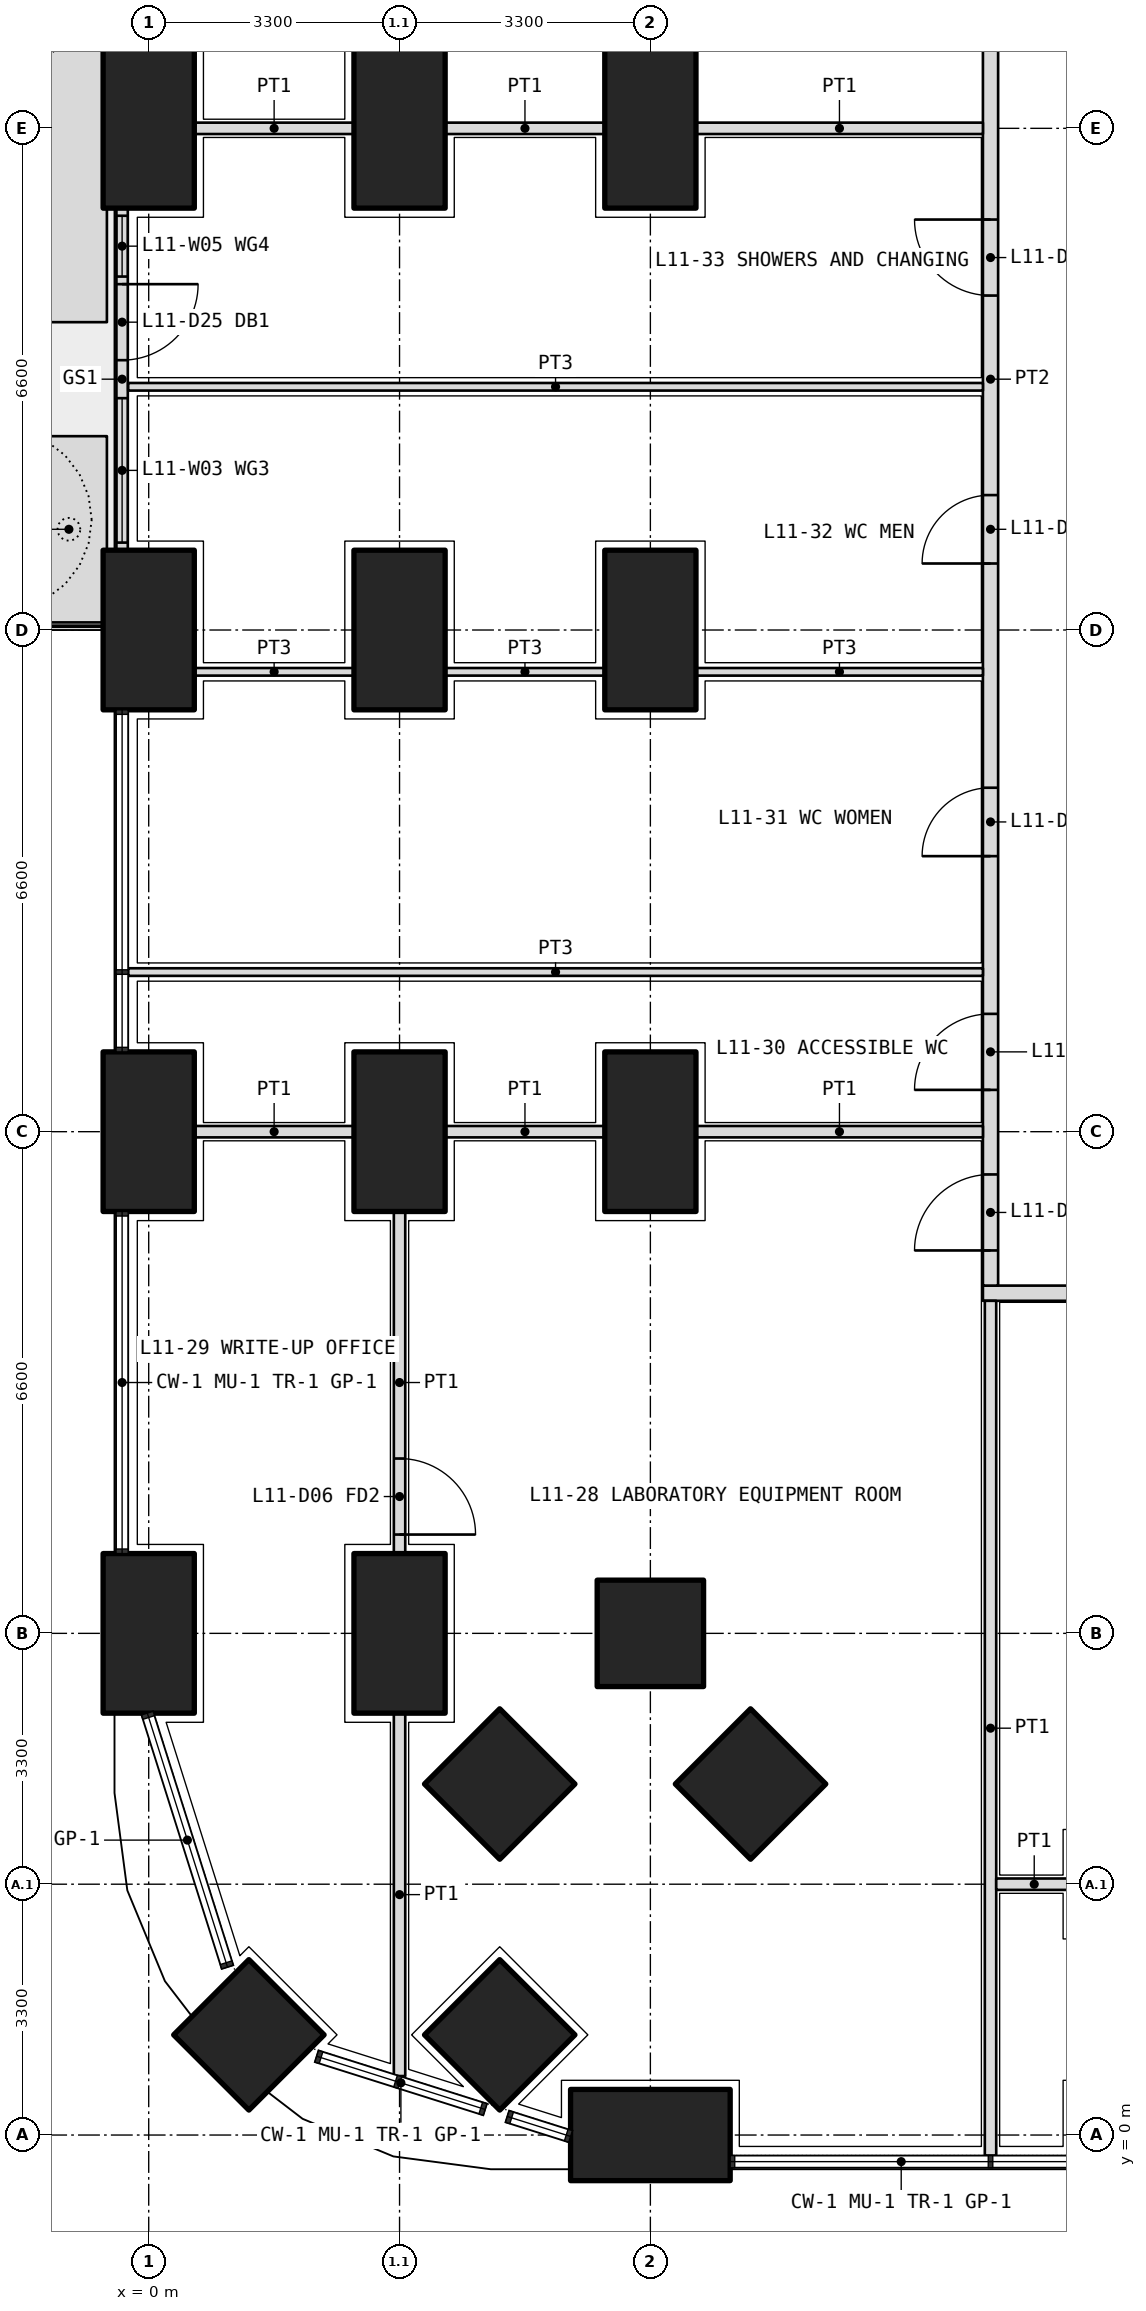
"""IFC4 building model, lengths in metres.
Left out: names, types, materials, properties, quantities, classifications, styles, units other than length and angle.
Written with IfcOpenShell. Run it as: python <this file> out.ifc"""

import sys

from ifc_helpers import new_model, si_unit, direction, frame, frame_2d, origin, origin_2d, place, context, subcontext, project, spatial, polyline, rectangle, outline, extrude, element, fill, save


model = new_model("IFC4")
c1 = context("Model", 3, precision=1e-05, world=origin(), true_north=direction((0.0, 1.0)))
c2 = subcontext(c1, "Body", "Model", "MODEL_VIEW")
j1 = project(units=[si_unit("LENGTHUNIT", "METRE"), si_unit("PLANEANGLEUNIT", "RADIAN")], contexts=[c1])
p1 = place(None, origin())
s1 = spatial("IfcSite", under=j1, at=p1, CompositionType="ELEMENT")
p2 = place(p1, origin())
s2 = spatial("IfcBuilding", under=s1, at=p2, CompositionType="ELEMENT")
p3 = place(p2, frame((0.0, 0.0, 50.7)))
s3 = spatial("IfcBuildingStorey", under=s2, at=p3, CompositionType="ELEMENT", Elevation=50.7)
p4 = place(p3, frame((1.318, 1.318, 0.0), z_axis=(0.0, 0.0, 1.0), x_axis=(0.707106781187, 0.707106781187, 0.0)))
e1 = element("IfcColumn", 1, at=p4, inside=s3, PredefinedType="COLUMN", context=c2, shape_type="SweptSolid", body=[
    extrude(rectangle(XDim=1.4, YDim=1.4, at=origin_2d()), origin(), (0.0, 0.0, 1.0), 4.2),
])
for number, where, z_axis, x_axis in (
    (2, (6.6, 0.0, 0.0), (0.0, 0.0, 1.0), (1.0, 0.0, 0.0)),
    (3, (0.0, 6.6, 0.0), (0.0, 0.0, 1.0), (0.0, 1.0, 0.0)),
    (4, (0.0, 13.2, 0.0), (0.0, 0.0, 1.0), (0.0, 1.0, 0.0)),
    (5, (0.0, 19.8, 0.0), (0.0, 0.0, 1.0), (0.0, 1.0, 0.0)),
    (6, (0.0, 26.4, 0.0), (0.0, 0.0, 1.0), (0.0, 1.0, 0.0)),
):
    element("IfcColumn", number, at=place(p3, frame(where, z_axis=z_axis, x_axis=x_axis)), inside=s3, PredefinedType="COLUMN", context=c2, shape_type="SweptSolid", body=[
        extrude(rectangle(XDim=2.1, YDim=1.2, at=origin_2d()), origin(), (0.0, 0.0, 1.0), 4.2),
    ])
for number, where, z_axis, x_axis in (
    (7, (6.6, 6.6, 0.0), (0.0, 0.0, 1.0), (1.0, 0.0, 0.0)),
    (8, (4.618, 1.318, 0.0), (0.0, 0.0, 1.0), (0.707, 0.707, 0.0)),
):
    element("IfcColumn", number, at=place(p3, frame(where, z_axis=z_axis, x_axis=x_axis)), inside=s3, PredefinedType="COLUMN", context=c2, shape_type="SweptSolid", body=[
        extrude(rectangle(XDim=1.4, YDim=1.4, at=origin_2d()), origin(), (0.0, 0.0, 1.0), 4.2),
    ])
for number, where, z_axis, x_axis in (
    (9, (3.3, 6.6, 0.0), (0.0, 0.0, 1.0), (0.0, 1.0, 0.0)),
    (10, (3.3, 13.2, 0.0), (0.0, 0.0, 1.0), (0.0, 1.0, 0.0)),
    (11, (3.3, 19.8, 0.0), (0.0, 0.0, 1.0), (0.0, 1.0, 0.0)),
    (12, (3.3, 26.4, 0.0), (0.0, 0.0, 1.0), (0.0, 1.0, 0.0)),
):
    element("IfcColumn", number, at=place(p3, frame(where, z_axis=z_axis, x_axis=x_axis)), inside=s3, PredefinedType="COLUMN", context=c2, shape_type="SweptSolid", body=[
        extrude(rectangle(XDim=2.1, YDim=1.2, at=origin_2d()), origin(), (0.0, 0.0, 1.0), 4.2),
    ])
for number, where, z_axis, x_axis in (
    (13, (4.618, 4.618, 0.0), (0.0, 0.0, 1.0), (0.707, 0.707, 0.0)),
    (14, (7.918, 4.618, 0.0), (0.0, 0.0, 1.0), (0.707, 0.707, 0.0)),
):
    element("IfcColumn", number, at=place(p3, frame(where, z_axis=z_axis, x_axis=x_axis)), inside=s3, PredefinedType="COLUMN", context=c2, shape_type="SweptSolid", body=[
        extrude(rectangle(XDim=1.4, YDim=1.4, at=origin_2d()), origin(), (0.0, 0.0, 1.0), 4.2),
    ])
for number, where, z_axis, x_axis in (
    (15, (6.6, 13.2, 0.0), (0.0, 0.0, 1.0), (0.0, 1.0, 0.0)),
    (16, (6.6, 19.8, 0.0), (0.0, 0.0, 1.0), (0.0, 1.0, 0.0)),
    (17, (6.6, 26.4, 0.0), (0.0, 0.0, 1.0), (0.0, 1.0, 0.0)),
):
    element("IfcColumn", number, at=place(p3, frame(where, z_axis=z_axis, x_axis=x_axis)), inside=s3, PredefinedType="COLUMN", context=c2, shape_type="SweptSolid", body=[
        extrude(rectangle(XDim=2.1, YDim=1.2, at=origin_2d()), origin(), (0.0, 0.0, 1.0), 4.2),
    ])
p5 = place(p3, origin())
e18 = element("IfcWall", 18, at=p5, inside=s3, PredefinedType="USERDEFINED", context=c2, shape_type="SweptSolid", body=[
    extrude(outline(polyline([(-1.55, 19.9), (-0.55, 19.9), (-0.55, 22.35), (-1.55, 22.35), (-1.55, 19.9)]), holes=[polyline([(-1.4, 20.05), (-0.7, 20.05), (-0.7, 22.2), (-1.4, 22.2), (-1.4, 20.05)])]), origin(), (0.0, 0.0, 1.0), 1.05),
])
p6 = place(p3, origin())
e19 = element("IfcWall", 19, at=p6, inside=s3, PredefinedType="USERDEFINED", context=c2, shape_type="SweptSolid", body=[
    extrude(outline(polyline([(-1.55, 23.85), (-0.55, 23.85), (-0.55, 32.9), (-1.55, 32.9), (-1.55, 23.85)]), holes=[polyline([(-1.4, 24.0), (-0.7, 24.0), (-0.7, 32.75), (-1.4, 32.75), (-1.4, 24.0)])]), origin(), (0.0, 0.0, 1.0), 1.05),
])
p7 = place(p3, frame((-0.35, 25.35, 0.0), z_axis=(0.0, 0.0, 1.0), x_axis=(0.0, -1.0, 0.0)))
e20 = element("IfcWall", 20, at=p7, inside=s3, PredefinedType="SOLIDWALL", context=c2, shape_type="SweptSolid", body=[
    extrude(rectangle(XDim=4.5, YDim=0.15, at=frame_2d((2.25, 0.0))), origin(), (0.0, 0.0, 1.0), 2.7),
])
p8 = place(p7, frame((1.0, 0.0, 0.0)))
e21 = element("IfcOpeningElement", 21, at=p8, cuts=e20, PredefinedType="OPENING", context=c2, shape_type="SweptSolid", body=[
    extrude(rectangle(XDim=1.0, YDim=2.4, at=frame_2d((0.5, 1.2))), frame((0.0, 0.085, 0.0), z_axis=(0.0, -1.0, 0.0), x_axis=(1.0, 0.0, 0.0)), (0.0, 0.0, 1.0), 0.17),
])
p9 = place(p7, frame((0.1, 0.0, 0.1)))
e22 = element("IfcOpeningElement", 22, at=p9, cuts=e20, PredefinedType="OPENING", context=c2, shape_type="SweptSolid", body=[
    extrude(rectangle(XDim=0.8, YDim=2.3, at=frame_2d((0.4, 1.15))), frame((0.0, 0.085, 0.0), z_axis=(0.0, -1.0, 0.0), x_axis=(1.0, 0.0, 0.0)), (0.0, 0.0, 1.0), 0.17),
])
p10 = place(p7, frame((2.5, 0.0, 0.1)))
e23 = element("IfcOpeningElement", 23, at=p10, cuts=e20, PredefinedType="OPENING", context=c2, shape_type="SweptSolid", body=[
    extrude(rectangle(XDim=1.9, YDim=2.3, at=frame_2d((0.95, 1.15))), frame((0.0, 0.085, 0.0), z_axis=(0.0, -1.0, 0.0), x_axis=(1.0, 0.0, 0.0)), (0.0, 0.0, 1.0), 0.17),
])
p11 = place(p3, frame((10.975, 11.075, 0.0), z_axis=(0.0, 0.0, 1.0), x_axis=(1.0, 0.0, 0.0)))
e24 = element("IfcWall", 24, at=p11, inside=s3, PredefinedType="PARTITIONING", context=c2, shape_type="SweptSolid", body=[
    extrude(rectangle(XDim=12.125, YDim=0.2, at=frame_2d((6.062, 0.0))), origin(), (0.0, 0.0, 1.0), 2.85),
])
p12 = place(p11, frame((5.613, 0.0, 0.0)))
e25 = element("IfcOpeningElement", 25, at=p12, cuts=e24, PredefinedType="OPENING", context=c2, shape_type="SweptSolid", body=[
    extrude(rectangle(XDim=1.0, YDim=2.1, at=frame_2d((0.5, 1.05))), frame((0.0, 0.11, 0.0), z_axis=(0.0, -1.0, 0.0), x_axis=(1.0, 0.0, 0.0)), (0.0, 0.0, 1.0), 0.22),
])
p13 = place(p3, frame((11.075, 11.175, 0.0), z_axis=(0.0, 0.0, 1.0), x_axis=(0.0, 1.0, 0.0)))
e26 = element("IfcWall", 26, at=p13, inside=s3, PredefinedType="PARTITIONING", context=c2, shape_type="SweptSolid", body=[
    extrude(rectangle(XDim=23.85, YDim=0.2, at=frame_2d((11.925, 0.0))), origin(), (0.0, 0.0, 1.0), 2.85),
])
p14 = place(p13, frame((0.462, 0.0, 0.0)))
e27 = element("IfcOpeningElement", 27, at=p14, cuts=e26, PredefinedType="OPENING", context=c2, shape_type="SweptSolid", body=[
    extrude(rectangle(XDim=1.0, YDim=2.1, at=frame_2d((0.5, 1.05))), frame((0.0, 0.11, 0.0), z_axis=(0.0, -1.0, 0.0), x_axis=(1.0, 0.0, 0.0)), (0.0, 0.0, 1.0), 0.22),
])
p15 = place(p13, frame((2.575, 0.0, 0.0)))
e28 = element("IfcOpeningElement", 28, at=p15, cuts=e26, PredefinedType="OPENING", context=c2, shape_type="SweptSolid", body=[
    extrude(rectangle(XDim=1.0, YDim=2.1, at=frame_2d((0.5, 1.05))), frame((0.0, 0.11, 0.0), z_axis=(0.0, -1.0, 0.0), x_axis=(1.0, 0.0, 0.0)), (0.0, 0.0, 1.0), 0.22),
])
p16 = place(p13, frame((5.65, 0.0, 0.0)))
e29 = element("IfcOpeningElement", 29, at=p16, cuts=e26, PredefinedType="OPENING", context=c2, shape_type="SweptSolid", body=[
    extrude(rectangle(XDim=0.9, YDim=2.1, at=frame_2d((0.45, 1.05))), frame((0.0, 0.11, 0.0), z_axis=(0.0, -1.0, 0.0), x_axis=(1.0, 0.0, 0.0)), (0.0, 0.0, 1.0), 0.22),
])
p17 = place(p13, frame((9.5, 0.0, 0.0)))
e30 = element("IfcOpeningElement", 30, at=p17, cuts=e26, PredefinedType="OPENING", context=c2, shape_type="SweptSolid", body=[
    extrude(rectangle(XDim=0.9, YDim=2.1, at=frame_2d((0.45, 1.05))), frame((0.0, 0.11, 0.0), z_axis=(0.0, -1.0, 0.0), x_axis=(1.0, 0.0, 0.0)), (0.0, 0.0, 1.0), 0.22),
])
p18 = place(p13, frame((13.025, 0.0, 0.0)))
e31 = element("IfcOpeningElement", 31, at=p18, cuts=e26, PredefinedType="OPENING", context=c2, shape_type="SweptSolid", body=[
    extrude(rectangle(XDim=1.0, YDim=2.1, at=frame_2d((0.5, 1.05))), frame((0.0, 0.11, 0.0), z_axis=(0.0, -1.0, 0.0), x_axis=(1.0, 0.0, 0.0)), (0.0, 0.0, 1.0), 0.22),
])
p19 = place(p13, frame((18.025, 0.0, 0.0)))
e32 = element("IfcOpeningElement", 32, at=p19, cuts=e26, PredefinedType="OPENING", context=c2, shape_type="SweptSolid", body=[
    extrude(rectangle(XDim=1.0, YDim=2.1, at=frame_2d((0.5, 1.05))), frame((0.0, 0.11, 0.0), z_axis=(0.0, -1.0, 0.0), x_axis=(1.0, 0.0, 0.0)), (0.0, 0.0, 1.0), 0.22),
])
p20 = place(p13, frame((22.387, 0.0, 0.0)))
e33 = element("IfcOpeningElement", 33, at=p20, cuts=e26, PredefinedType="OPENING", context=c2, shape_type="SweptSolid", body=[
    extrude(rectangle(XDim=1.0, YDim=2.1, at=frame_2d((0.5, 1.05))), frame((0.0, 0.11, 0.0), z_axis=(0.0, -1.0, 0.0), x_axis=(1.0, 0.0, 0.0)), (0.0, 0.0, 1.0), 0.22),
])
p21 = place(p3, frame((11.075, -0.27, 0.0), z_axis=(0.0, 0.0, 1.0), x_axis=(0.0, 1.0, 0.0)))
e34 = element("IfcWall", 34, at=p21, inside=s3, PredefinedType="PARTITIONING", context=c2, shape_type="SweptSolid", body=[
    extrude(rectangle(XDim=11.245, YDim=0.15, at=frame_2d((5.623, 0.0))), origin(), (0.0, 0.0, 1.0), 2.7),
])
p22 = place(p3, frame((11.15, 3.3, 0.0), z_axis=(0.0, 0.0, 1.0), x_axis=(1.0, 0.0, 0.0)))
e35 = element("IfcWall", 35, at=p22, inside=s3, PredefinedType="PARTITIONING", context=c2, shape_type="SweptSolid", body=[
    extrude(rectangle(XDim=1.0, YDim=0.15, at=frame_2d((0.5, 0.0))), origin(), (0.0, 0.0, 1.0), 3.9),
])
p23 = place(p3, frame((3.3, 12.15, 0.0), z_axis=(0.0, 0.0, 1.0), x_axis=(0.0, -1.0, 0.0)))
e36 = element("IfcWall", 36, at=p23, inside=s3, PredefinedType="PARTITIONING", context=c2, shape_type="SweptSolid", body=[
    extrude(rectangle(XDim=4.5, YDim=0.15, at=frame_2d((2.25, 0.0))), origin(), (0.0, 0.0, 1.0), 3.9),
])
p24 = place(p23, frame((3.25, 0.0, 0.0)))
e37 = element("IfcOpeningElement", 37, at=p24, cuts=e36, PredefinedType="OPENING", context=c2, shape_type="SweptSolid", body=[
    extrude(rectangle(XDim=1.0, YDim=2.1, at=frame_2d((0.5, 1.05))), frame((0.0, 0.085, 0.0), z_axis=(0.0, -1.0, 0.0), x_axis=(1.0, 0.0, 0.0)), (0.0, 0.0, 1.0), 0.17),
])
p25 = place(p3, frame((3.3, 5.55, 0.0), z_axis=(0.0, 0.0, 1.0), x_axis=(0.0, -1.0, 0.0)))
e38 = element("IfcWall", 38, at=p25, inside=s3, PredefinedType="PARTITIONING", context=c2, shape_type="SweptSolid", body=[
    extrude(rectangle(XDim=4.774, YDim=0.15, at=frame_2d((2.387, 0.0))), origin(), (0.0, 0.0, 1.0), 2.7),
])
p26 = place(p3, frame((-0.27, 15.3, 0.0), z_axis=(0.0, 0.0, 1.0), x_axis=(1.0, 0.0, 0.0)))
e39 = element("IfcWall", 39, at=p26, inside=s3, PredefinedType="PARTITIONING", context=c2, shape_type="SweptSolid", body=[
    extrude(rectangle(XDim=11.245, YDim=0.1, at=frame_2d((5.623, 0.0))), origin(), (0.0, 0.0, 1.0), 2.7),
])
p27 = place(p3, frame((0.6, 19.25, 0.0), z_axis=(0.0, 0.0, 1.0), x_axis=(1.0, 0.0, 0.0)))
e40 = element("IfcWall", 40, at=p27, inside=s3, PredefinedType="PARTITIONING", context=c2, shape_type="SweptSolid", body=[
    extrude(rectangle(XDim=2.1, YDim=0.1, at=frame_2d((1.05, 0.0))), origin(), (0.0, 0.0, 1.0), 2.85),
])
p28 = place(p3, frame((3.9, 19.25, 0.0), z_axis=(0.0, 0.0, 1.0), x_axis=(1.0, 0.0, 0.0)))
e41 = element("IfcWall", 41, at=p28, inside=s3, PredefinedType="PARTITIONING", context=c2, shape_type="SweptSolid", body=[
    extrude(rectangle(XDim=2.1, YDim=0.1, at=frame_2d((1.05, 0.0))), origin(), (0.0, 0.0, 1.0), 2.85),
])
p29 = place(p3, frame((7.2, 19.25, 0.0), z_axis=(0.0, 0.0, 1.0), x_axis=(1.0, 0.0, 0.0)))
e42 = element("IfcWall", 42, at=p29, inside=s3, PredefinedType="PARTITIONING", context=c2, shape_type="SweptSolid", body=[
    extrude(rectangle(XDim=3.775, YDim=0.1, at=frame_2d((1.888, 0.0))), origin(), (0.0, 0.0, 1.0), 2.85),
])
p30 = place(p3, frame((-0.27, 23.0, 0.0), z_axis=(0.0, 0.0, 1.0), x_axis=(1.0, 0.0, 0.0)))
e43 = element("IfcWall", 43, at=p30, inside=s3, PredefinedType="PARTITIONING", context=c2, shape_type="SweptSolid", body=[
    extrude(rectangle(XDim=11.245, YDim=0.1, at=frame_2d((5.623, 0.0))), origin(), (0.0, 0.0, 1.0), 2.7),
])
p31 = place(p3, frame((0.6, 13.2, 0.0), z_axis=(0.0, 0.0, 1.0), x_axis=(1.0, 0.0, 0.0)))
e44 = element("IfcWall", 44, at=p31, inside=s3, PredefinedType="PARTITIONING", context=c2, shape_type="SweptSolid", body=[
    extrude(rectangle(XDim=2.1, YDim=0.15, at=frame_2d((1.05, 0.0))), origin(), (0.0, 0.0, 1.0), 2.85),
])
p32 = place(p3, frame((3.9, 13.2, 0.0), z_axis=(0.0, 0.0, 1.0), x_axis=(1.0, 0.0, 0.0)))
e45 = element("IfcWall", 45, at=p32, inside=s3, PredefinedType="PARTITIONING", context=c2, shape_type="SweptSolid", body=[
    extrude(rectangle(XDim=2.1, YDim=0.15, at=frame_2d((1.05, 0.0))), origin(), (0.0, 0.0, 1.0), 2.85),
])
p33 = place(p3, frame((7.2, 13.2, 0.0), z_axis=(0.0, 0.0, 1.0), x_axis=(1.0, 0.0, 0.0)))
e46 = element("IfcWall", 46, at=p33, inside=s3, PredefinedType="PARTITIONING", context=c2, shape_type="SweptSolid", body=[
    extrude(rectangle(XDim=3.775, YDim=0.15, at=frame_2d((1.888, 0.0))), origin(), (0.0, 0.0, 1.0), 2.85),
])
p34 = place(p3, frame((0.6, 26.4, 0.0), z_axis=(0.0, 0.0, 1.0), x_axis=(1.0, 0.0, 0.0)))
e47 = element("IfcWall", 47, at=p34, inside=s3, PredefinedType="PARTITIONING", context=c2, shape_type="SweptSolid", body=[
    extrude(rectangle(XDim=2.1, YDim=0.15, at=frame_2d((1.05, 0.0))), origin(), (0.0, 0.0, 1.0), 2.85),
])
p35 = place(p3, frame((3.9, 26.4, 0.0), z_axis=(0.0, 0.0, 1.0), x_axis=(1.0, 0.0, 0.0)))
e48 = element("IfcWall", 48, at=p35, inside=s3, PredefinedType="PARTITIONING", context=c2, shape_type="SweptSolid", body=[
    extrude(rectangle(XDim=2.1, YDim=0.15, at=frame_2d((1.05, 0.0))), origin(), (0.0, 0.0, 1.0), 2.85),
])
p36 = place(p3, frame((7.2, 26.4, 0.0), z_axis=(0.0, 0.0, 1.0), x_axis=(1.0, 0.0, 0.0)))
e49 = element("IfcWall", 49, at=p36, inside=s3, PredefinedType="PARTITIONING", context=c2, shape_type="SweptSolid", body=[
    extrude(rectangle(XDim=3.775, YDim=0.15, at=frame_2d((1.888, 0.0))), origin(), (0.0, 0.0, 1.0), 2.85),
])
p37 = place(p8, origin())
e50 = element("IfcDoor", 50, at=p37, inside=s3, OperationType="SINGLE_SWING_LEFT", PredefinedType="DOOR", context=c2, shape_type="SweptSolid", body=[
    extrude(rectangle(XDim=1.0, YDim=2.4, at=frame_2d((0.5, 1.2))), frame((0.0, 0.025, 0.0), z_axis=(0.0, -1.0, 0.0), x_axis=(1.0, 0.0, 0.0)), (0.0, 0.0, 1.0), 0.05),
])
fill(e21, e50)
p38 = place(p9, origin())
e51 = element("IfcWindow", 51, at=p38, inside=s3, PartitioningType="SINGLE_PANEL", PredefinedType="WINDOW", context=c2, shape_type="SweptSolid", body=[
    extrude(rectangle(XDim=0.8, YDim=2.3, at=frame_2d((0.4, 1.15))), frame((0.0, 0.03, 0.0), z_axis=(0.0, -1.0, 0.0), x_axis=(1.0, 0.0, 0.0)), (0.0, 0.0, 1.0), 0.06),
])
fill(e22, e51)
p39 = place(p10, origin())
e52 = element("IfcWindow", 52, at=p39, inside=s3, PartitioningType="SINGLE_PANEL", PredefinedType="WINDOW", context=c2, shape_type="SweptSolid", body=[
    extrude(rectangle(XDim=1.9, YDim=2.3, at=frame_2d((0.95, 1.15))), frame((0.0, 0.03, 0.0), z_axis=(0.0, -1.0, 0.0), x_axis=(1.0, 0.0, 0.0)), (0.0, 0.0, 1.0), 0.06),
])
fill(e23, e52)
p40 = place(p14, origin())
e53 = element("IfcDoor", 53, at=p40, inside=s3, OperationType="SINGLE_SWING_LEFT", PredefinedType="DOOR", context=c2, shape_type="SweptSolid", body=[
    extrude(rectangle(XDim=1.0, YDim=2.1, at=frame_2d((0.5, 1.05))), frame((0.0, 0.025, 0.0), z_axis=(0.0, -1.0, 0.0), x_axis=(1.0, 0.0, 0.0)), (0.0, 0.0, 1.0), 0.05),
])
fill(e27, e53)
p41 = place(p24, origin())
e54 = element("IfcDoor", 54, at=p41, inside=s3, OperationType="SINGLE_SWING_RIGHT", PredefinedType="DOOR", context=c2, shape_type="SweptSolid", body=[
    extrude(rectangle(XDim=1.0, YDim=2.1, at=frame_2d((0.5, 1.05))), frame((0.0, 0.025, 0.0), z_axis=(0.0, -1.0, 0.0), x_axis=(1.0, 0.0, 0.0)), (0.0, 0.0, 1.0), 0.05),
])
fill(e37, e54)
p42 = place(p15, origin())
e55 = element("IfcDoor", 55, at=p42, inside=s3, OperationType="SINGLE_SWING_LEFT", PredefinedType="DOOR", context=c2, shape_type="SweptSolid", body=[
    extrude(rectangle(XDim=1.0, YDim=2.1, at=frame_2d((0.5, 1.05))), frame((0.0, 0.025, 0.0), z_axis=(0.0, -1.0, 0.0), x_axis=(1.0, 0.0, 0.0)), (0.0, 0.0, 1.0), 0.05),
])
fill(e28, e55)
p43 = place(p16, origin())
e56 = element("IfcDoor", 56, at=p43, inside=s3, OperationType="SINGLE_SWING_LEFT", PredefinedType="DOOR", context=c2, shape_type="SweptSolid", body=[
    extrude(rectangle(XDim=0.9, YDim=2.1, at=frame_2d((0.45, 1.05))), frame((0.0, 0.025, 0.0), z_axis=(0.0, -1.0, 0.0), x_axis=(1.0, 0.0, 0.0)), (0.0, 0.0, 1.0), 0.05),
])
fill(e29, e56)
p44 = place(p17, origin())
e57 = element("IfcDoor", 57, at=p44, inside=s3, OperationType="SINGLE_SWING_LEFT", PredefinedType="DOOR", context=c2, shape_type="SweptSolid", body=[
    extrude(rectangle(XDim=0.9, YDim=2.1, at=frame_2d((0.45, 1.05))), frame((0.0, 0.025, 0.0), z_axis=(0.0, -1.0, 0.0), x_axis=(1.0, 0.0, 0.0)), (0.0, 0.0, 1.0), 0.05),
])
fill(e30, e57)
p45 = place(p18, origin())
e58 = element("IfcDoor", 58, at=p45, inside=s3, OperationType="SINGLE_SWING_RIGHT", PredefinedType="DOOR", context=c2, shape_type="SweptSolid", body=[
    extrude(rectangle(XDim=1.0, YDim=2.1, at=frame_2d((0.5, 1.05))), frame((0.0, 0.025, 0.0), z_axis=(0.0, -1.0, 0.0), x_axis=(1.0, 0.0, 0.0)), (0.0, 0.0, 1.0), 0.05),
])
fill(e31, e58)
save(model, sys.argv[1])
